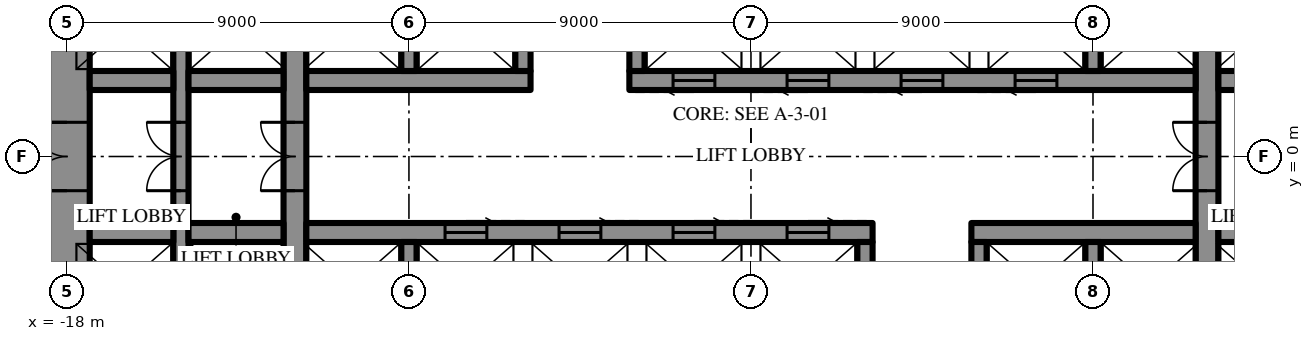
"""IFC4 building model, lengths in metres.
Left out: names, types, materials, properties, quantities, classifications, styles, units other than length and angle.
Written with IfcOpenShell. Run it as: python <this file> out.ifc"""

import sys

from ifc_helpers import new_model, si_unit, direction, frame, frame_2d, origin, place, context, subcontext, project, spatial, rectangle, extrude, element, fill, save


model = new_model("IFC4")
c1 = context("Model", 3, precision=1e-05, world=origin(), true_north=direction((0.0, 1.0)))
c2 = subcontext(c1, "Body", "Model", "MODEL_VIEW")
j1 = project(units=[si_unit("LENGTHUNIT", "METRE"), si_unit("PLANEANGLEUNIT", "RADIAN")], contexts=[c1])
p1 = place(None, origin())
s1 = spatial("IfcSite", under=j1, at=p1, CompositionType="ELEMENT")
p2 = place(p1, origin())
s2 = spatial("IfcBuilding", under=s1, at=p2, CompositionType="ELEMENT")
p3 = place(p2, frame((0.0, 0.0, 31.9)))
s3 = spatial("IfcBuildingStorey", under=s2, at=p3, CompositionType="ELEMENT", Elevation=31.9)
p4 = place(p3, frame((-18.0, 10.7, 0.0), z_axis=(0.0, 0.0, 1.0), x_axis=(0.0, -1.0, 0.0)))
e1 = element("IfcWall", 1, at=p4, inside=s3, PredefinedType="SHEAR", context=c2, shape_type="SweptSolid", body=[
    extrude(rectangle(XDim=21.4, YDim=1.2, at=frame_2d((10.7, 0.0))), origin(), (0.0, 0.0, 1.0), 4.2),
])
p5 = place(p4, frame((9.8, 0.0, 0.0)))
e2 = element("IfcOpeningElement", 2, at=p5, cuts=e1, PredefinedType="OPENING", context=c2, shape_type="SweptSolid", body=[
    extrude(rectangle(XDim=1.8, YDim=2.4, at=frame_2d((0.9, 1.2))), frame((0.0, 0.61, 0.0), z_axis=(0.0, -1.0, 0.0), x_axis=(1.0, 0.0, 0.0)), (0.0, 0.0, 1.0), 1.22),
])
p6 = place(p3, frame((12.0, -10.7, 0.0), z_axis=(0.0, 0.0, 1.0), x_axis=(0.0, 1.0, 0.0)))
e3 = element("IfcWall", 3, at=p6, inside=s3, PredefinedType="SHEAR", context=c2, shape_type="SweptSolid", body=[
    extrude(rectangle(XDim=21.4, YDim=0.6, at=frame_2d((10.7, 0.0))), origin(), (0.0, 0.0, 1.0), 4.2),
])
p7 = place(p6, frame((9.8, 0.0, 0.0)))
e4 = element("IfcOpeningElement", 4, at=p7, cuts=e3, PredefinedType="OPENING", context=c2, shape_type="SweptSolid", body=[
    extrude(rectangle(XDim=1.8, YDim=2.4, at=frame_2d((0.9, 1.2))), frame((0.0, 0.31, 0.0), z_axis=(0.0, -1.0, 0.0), x_axis=(1.0, 0.0, 0.0)), (0.0, 0.0, 1.0), 0.62),
])
p8 = place(p3, frame((-12.0, -10.7, 0.0), z_axis=(0.0, 0.0, 1.0), x_axis=(0.0, 1.0, 0.0)))
e5 = element("IfcWall", 5, at=p8, inside=s3, PredefinedType="SHEAR", context=c2, shape_type="SweptSolid", body=[
    extrude(rectangle(XDim=21.4, YDim=0.6, at=frame_2d((10.7, 0.0))), origin(), (0.0, 0.0, 1.0), 4.2),
])
p9 = place(p8, frame((9.8, 0.0, 0.0)))
e6 = element("IfcOpeningElement", 6, at=p9, cuts=e5, PredefinedType="OPENING", context=c2, shape_type="SweptSolid", body=[
    extrude(rectangle(XDim=1.8, YDim=2.4, at=frame_2d((0.9, 1.2))), frame((0.0, 0.31, 0.0), z_axis=(0.0, -1.0, 0.0), x_axis=(1.0, 0.0, 0.0)), (0.0, 0.0, 1.0), 0.62),
])
p10 = place(p3, frame((-15.0, -10.7, 0.0), z_axis=(0.0, 0.0, 1.0), x_axis=(0.0, 1.0, 0.0)))
e7 = element("IfcWall", 7, at=p10, inside=s3, PredefinedType="SHEAR", context=c2, shape_type="SweptSolid", body=[
    extrude(rectangle(XDim=21.4, YDim=0.4, at=frame_2d((10.7, 0.0))), origin(), (0.0, 0.0, 1.0), 4.2),
])
p11 = place(p10, frame((9.8, 0.0, 0.0)))
e8 = element("IfcOpeningElement", 8, at=p11, cuts=e7, PredefinedType="OPENING", context=c2, shape_type="SweptSolid", body=[
    extrude(rectangle(XDim=1.8, YDim=2.4, at=frame_2d((0.9, 1.2))), frame((0.0, 0.21, 0.0), z_axis=(0.0, -1.0, 0.0), x_axis=(1.0, 0.0, 0.0)), (0.0, 0.0, 1.0), 0.42),
])
p12 = place(p3, frame((-17.4, 2.0, 0.0), z_axis=(0.0, 0.0, 1.0), x_axis=(1.0, 0.0, 0.0)))
e9 = element("IfcWall", 9, at=p12, inside=s3, PredefinedType="SHEAR", context=c2, shape_type="SweptSolid", body=[
    extrude(rectangle(XDim=2.2, YDim=0.5, at=frame_2d((1.1, 0.0))), origin(), (0.0, 0.0, 1.0), 4.2),
])
p13 = place(p3, frame((-14.8, 2.0, 0.0), z_axis=(0.0, 0.0, 1.0), x_axis=(1.0, 0.0, 0.0)))
e10 = element("IfcWall", 10, at=p13, inside=s3, PredefinedType="SHEAR", context=c2, shape_type="SweptSolid", body=[
    extrude(rectangle(XDim=2.5, YDim=0.5, at=frame_2d((1.25, 0.0))), origin(), (0.0, 0.0, 1.0), 4.2),
])
p14 = place(p3, frame((-11.7, 2.0, 0.0), z_axis=(0.0, 0.0, 1.0), x_axis=(1.0, 0.0, 0.0)))
e11 = element("IfcWall", 11, at=p14, inside=s3, PredefinedType="SHEAR", context=c2, shape_type="SweptSolid", body=[
    extrude(rectangle(XDim=5.9, YDim=0.5, at=frame_2d((2.95, 0.0))), origin(), (0.0, 0.0, 1.0), 4.2),
])
p15 = place(p3, frame((-3.2, 2.0, 0.0), z_axis=(0.0, 0.0, 1.0), x_axis=(1.0, 0.0, 0.0)))
e12 = element("IfcWall", 12, at=p15, inside=s3, PredefinedType="SHEAR", context=c2, shape_type="SweptSolid", body=[
    extrude(rectangle(XDim=14.9, YDim=0.5, at=frame_2d((7.45, 0.0))), origin(), (0.0, 0.0, 1.0), 4.2),
])
p16 = place(p15, frame((1.15, 0.0, 0.0)))
e13 = element("IfcOpeningElement", 13, at=p16, cuts=e12, PredefinedType="OPENING", context=c2, shape_type="SweptSolid", body=[
    extrude(rectangle(XDim=1.1, YDim=2.2, at=frame_2d((0.55, 1.1))), frame((0.0, 0.26, 0.0), z_axis=(0.0, -1.0, 0.0), x_axis=(1.0, 0.0, 0.0)), (0.0, 0.0, 1.0), 0.52),
])
p17 = place(p15, frame((4.15, 0.0, 0.0)))
e14 = element("IfcOpeningElement", 14, at=p17, cuts=e12, PredefinedType="OPENING", context=c2, shape_type="SweptSolid", body=[
    extrude(rectangle(XDim=1.1, YDim=2.2, at=frame_2d((0.55, 1.1))), frame((0.0, 0.26, 0.0), z_axis=(0.0, -1.0, 0.0), x_axis=(1.0, 0.0, 0.0)), (0.0, 0.0, 1.0), 0.52),
])
p18 = place(p15, frame((7.15, 0.0, 0.0)))
e15 = element("IfcOpeningElement", 15, at=p18, cuts=e12, PredefinedType="OPENING", context=c2, shape_type="SweptSolid", body=[
    extrude(rectangle(XDim=1.1, YDim=2.2, at=frame_2d((0.55, 1.1))), frame((0.0, 0.26, 0.0), z_axis=(0.0, -1.0, 0.0), x_axis=(1.0, 0.0, 0.0)), (0.0, 0.0, 1.0), 0.52),
])
p19 = place(p15, frame((10.15, 0.0, 0.0)))
e16 = element("IfcOpeningElement", 16, at=p19, cuts=e12, PredefinedType="OPENING", context=c2, shape_type="SweptSolid", body=[
    extrude(rectangle(XDim=1.1, YDim=2.2, at=frame_2d((0.55, 1.1))), frame((0.0, 0.26, 0.0), z_axis=(0.0, -1.0, 0.0), x_axis=(1.0, 0.0, 0.0)), (0.0, 0.0, 1.0), 0.52),
])
p20 = place(p3, frame((12.3, 2.0, 0.0), z_axis=(0.0, 0.0, 1.0), x_axis=(1.0, 0.0, 0.0)))
e17 = element("IfcWall", 17, at=p20, inside=s3, PredefinedType="SHEAR", context=c2, shape_type="SweptSolid", body=[
    extrude(rectangle(XDim=2.5, YDim=0.5, at=frame_2d((1.25, 0.0))), origin(), (0.0, 0.0, 1.0), 4.2),
])
for number, where, z_axis, x_axis in (
    (18, (-9.0, 2.25, 0.0), (0.0, 0.0, 1.0), (0.0, 1.0, 0.0)),
    (19, (-6.0, 2.25, 0.0), (0.0, 0.0, 1.0), (0.0, 1.0, 0.0)),
    (20, (-3.0, 2.25, 0.0), (0.0, 0.0, 1.0), (0.0, 1.0, 0.0)),
    (21, (9.0, 2.25, 0.0), (0.0, 0.0, 1.0), (0.0, 1.0, 0.0)),
):
    element("IfcWall", number, at=place(p3, frame(where, z_axis=z_axis, x_axis=x_axis)), inside=s3, PredefinedType="SHEAR", context=c2, shape_type="SweptSolid", body=[
        extrude(rectangle(XDim=2.3, YDim=0.4, at=frame_2d((1.15, 0.0))), origin(), (0.0, 0.0, 1.0), 4.2),
    ])
p21 = place(p3, frame((14.8, -2.0, 0.0), z_axis=(0.0, 0.0, 1.0), x_axis=(-1.0, 0.0, 0.0)))
e22 = element("IfcWall", 22, at=p21, inside=s3, PredefinedType="SHEAR", context=c2, shape_type="SweptSolid", body=[
    extrude(rectangle(XDim=2.5, YDim=0.5, at=frame_2d((1.25, 0.0))), origin(), (0.0, 0.0, 1.0), 4.2),
])
p22 = place(p3, frame((11.7, -2.0, 0.0), z_axis=(0.0, 0.0, 1.0), x_axis=(-1.0, 0.0, 0.0)))
e23 = element("IfcWall", 23, at=p22, inside=s3, PredefinedType="SHEAR", context=c2, shape_type="SweptSolid", body=[
    extrude(rectangle(XDim=5.9, YDim=0.5, at=frame_2d((2.95, 0.0))), origin(), (0.0, 0.0, 1.0), 4.2),
])
p23 = place(p3, frame((3.2, -2.0, 0.0), z_axis=(0.0, 0.0, 1.0), x_axis=(-1.0, 0.0, 0.0)))
e24 = element("IfcWall", 24, at=p23, inside=s3, PredefinedType="SHEAR", context=c2, shape_type="SweptSolid", body=[
    extrude(rectangle(XDim=14.9, YDim=0.5, at=frame_2d((7.45, 0.0))), origin(), (0.0, 0.0, 1.0), 4.2),
])
p24 = place(p23, frame((1.15, 0.0, 0.0)))
e25 = element("IfcOpeningElement", 25, at=p24, cuts=e24, PredefinedType="OPENING", context=c2, shape_type="SweptSolid", body=[
    extrude(rectangle(XDim=1.1, YDim=2.2, at=frame_2d((0.55, 1.1))), frame((0.0, 0.26, 0.0), z_axis=(0.0, -1.0, 0.0), x_axis=(1.0, 0.0, 0.0)), (0.0, 0.0, 1.0), 0.52),
])
p25 = place(p23, frame((4.15, 0.0, 0.0)))
e26 = element("IfcOpeningElement", 26, at=p25, cuts=e24, PredefinedType="OPENING", context=c2, shape_type="SweptSolid", body=[
    extrude(rectangle(XDim=1.1, YDim=2.2, at=frame_2d((0.55, 1.1))), frame((0.0, 0.26, 0.0), z_axis=(0.0, -1.0, 0.0), x_axis=(1.0, 0.0, 0.0)), (0.0, 0.0, 1.0), 0.52),
])
p26 = place(p23, frame((7.15, 0.0, 0.0)))
e27 = element("IfcOpeningElement", 27, at=p26, cuts=e24, PredefinedType="OPENING", context=c2, shape_type="SweptSolid", body=[
    extrude(rectangle(XDim=1.1, YDim=2.2, at=frame_2d((0.55, 1.1))), frame((0.0, 0.26, 0.0), z_axis=(0.0, -1.0, 0.0), x_axis=(1.0, 0.0, 0.0)), (0.0, 0.0, 1.0), 0.52),
])
p27 = place(p23, frame((10.15, 0.0, 0.0)))
e28 = element("IfcOpeningElement", 28, at=p27, cuts=e24, PredefinedType="OPENING", context=c2, shape_type="SweptSolid", body=[
    extrude(rectangle(XDim=1.1, YDim=2.2, at=frame_2d((0.55, 1.1))), frame((0.0, 0.26, 0.0), z_axis=(0.0, -1.0, 0.0), x_axis=(1.0, 0.0, 0.0)), (0.0, 0.0, 1.0), 0.52),
])
p28 = place(p3, frame((-12.3, -2.0, 0.0), z_axis=(0.0, 0.0, 1.0), x_axis=(-1.0, 0.0, 0.0)))
e29 = element("IfcWall", 29, at=p28, inside=s3, PredefinedType="SHEAR", context=c2, shape_type="SweptSolid", body=[
    extrude(rectangle(XDim=2.5, YDim=0.5, at=frame_2d((1.25, 0.0))), origin(), (0.0, 0.0, 1.0), 4.2),
])
p29 = place(p3, frame((-15.2, -2.0, 0.0), z_axis=(0.0, 0.0, 1.0), x_axis=(-1.0, 0.0, 0.0)))
e30 = element("IfcWall", 30, at=p29, inside=s3, PredefinedType="SHEAR", context=c2, shape_type="SweptSolid", body=[
    extrude(rectangle(XDim=2.2, YDim=0.5, at=frame_2d((1.1, 0.0))), origin(), (0.0, 0.0, 1.0), 4.2),
])
for number, where, z_axis, x_axis in (
    (31, (9.0, -2.25, 0.0), (0.0, 0.0, 1.0), (0.0, -1.0, 0.0)),
    (32, (6.0, -2.25, 0.0), (0.0, 0.0, 1.0), (0.0, -1.0, 0.0)),
    (33, (3.0, -2.25, 0.0), (0.0, 0.0, 1.0), (0.0, -1.0, 0.0)),
    (34, (-9.0, -2.25, 0.0), (0.0, 0.0, 1.0), (0.0, -1.0, 0.0)),
):
    element("IfcWall", number, at=place(p3, frame(where, z_axis=z_axis, x_axis=x_axis)), inside=s3, PredefinedType="SHEAR", context=c2, shape_type="SweptSolid", body=[
        extrude(rectangle(XDim=2.3, YDim=0.4, at=frame_2d((1.15, 0.0))), origin(), (0.0, 0.0, 1.0), 4.2),
    ])
p30 = place(p5, frame((1.8, 0.0, 0.0), z_axis=(0.0, 0.0, 1.0), x_axis=(-1.0, 0.0, 0.0)))
e35 = element("IfcDoor", 35, at=p30, inside=s3, OperationType="DOUBLE_DOOR_SINGLE_SWING", PredefinedType="DOOR", context=c2, shape_type="SweptSolid", body=[
    extrude(rectangle(XDim=1.8, YDim=2.4, at=frame_2d((0.9, 1.2))), frame((0.0, 0.025, 0.0), z_axis=(0.0, -1.0, 0.0), x_axis=(1.0, 0.0, 0.0)), (0.0, 0.0, 1.0), 0.05),
])
fill(e2, e35)
p31 = place(p7, origin())
e36 = element("IfcDoor", 36, at=p31, inside=s3, OperationType="DOUBLE_DOOR_SINGLE_SWING", PredefinedType="DOOR", context=c2, shape_type="SweptSolid", body=[
    extrude(rectangle(XDim=1.8, YDim=2.4, at=frame_2d((0.9, 1.2))), frame((0.0, 0.025, 0.0), z_axis=(0.0, -1.0, 0.0), x_axis=(1.0, 0.0, 0.0)), (0.0, 0.0, 1.0), 0.05),
])
fill(e4, e36)
p32 = place(p9, origin())
e37 = element("IfcDoor", 37, at=p32, inside=s3, OperationType="DOUBLE_DOOR_SINGLE_SWING", PredefinedType="DOOR", context=c2, shape_type="SweptSolid", body=[
    extrude(rectangle(XDim=1.8, YDim=2.4, at=frame_2d((0.9, 1.2))), frame((0.0, 0.025, 0.0), z_axis=(0.0, -1.0, 0.0), x_axis=(1.0, 0.0, 0.0)), (0.0, 0.0, 1.0), 0.05),
])
fill(e6, e37)
p33 = place(p11, origin())
e38 = element("IfcDoor", 38, at=p33, inside=s3, OperationType="DOUBLE_DOOR_SINGLE_SWING", PredefinedType="DOOR", context=c2, shape_type="SweptSolid", body=[
    extrude(rectangle(XDim=1.8, YDim=2.4, at=frame_2d((0.9, 1.2))), frame((0.0, 0.025, 0.0), z_axis=(0.0, -1.0, 0.0), x_axis=(1.0, 0.0, 0.0)), (0.0, 0.0, 1.0), 0.05),
])
fill(e8, e38)
p34 = place(p16, frame((1.1, 0.0, 0.0), z_axis=(0.0, 0.0, 1.0), x_axis=(-1.0, 0.0, 0.0)))
e39 = element("IfcDoor", 39, at=p34, inside=s3, OperationType="SLIDING_TO_LEFT", PredefinedType="DOOR", context=c2, shape_type="SweptSolid", body=[
    extrude(rectangle(XDim=1.1, YDim=2.2, at=frame_2d((0.55, 1.1))), frame((0.0, 0.025, 0.0), z_axis=(0.0, -1.0, 0.0), x_axis=(1.0, 0.0, 0.0)), (0.0, 0.0, 1.0), 0.05),
])
fill(e13, e39)
p35 = place(p17, frame((1.1, 0.0, 0.0), z_axis=(0.0, 0.0, 1.0), x_axis=(-1.0, 0.0, 0.0)))
e40 = element("IfcDoor", 40, at=p35, inside=s3, OperationType="SLIDING_TO_LEFT", PredefinedType="DOOR", context=c2, shape_type="SweptSolid", body=[
    extrude(rectangle(XDim=1.1, YDim=2.2, at=frame_2d((0.55, 1.1))), frame((0.0, 0.025, 0.0), z_axis=(0.0, -1.0, 0.0), x_axis=(1.0, 0.0, 0.0)), (0.0, 0.0, 1.0), 0.05),
])
fill(e14, e40)
p36 = place(p18, frame((1.1, 0.0, 0.0), z_axis=(0.0, 0.0, 1.0), x_axis=(-1.0, 0.0, 0.0)))
e41 = element("IfcDoor", 41, at=p36, inside=s3, OperationType="SLIDING_TO_LEFT", PredefinedType="DOOR", context=c2, shape_type="SweptSolid", body=[
    extrude(rectangle(XDim=1.1, YDim=2.2, at=frame_2d((0.55, 1.1))), frame((0.0, 0.025, 0.0), z_axis=(0.0, -1.0, 0.0), x_axis=(1.0, 0.0, 0.0)), (0.0, 0.0, 1.0), 0.05),
])
fill(e15, e41)
p37 = place(p19, frame((1.1, 0.0, 0.0), z_axis=(0.0, 0.0, 1.0), x_axis=(-1.0, 0.0, 0.0)))
e42 = element("IfcDoor", 42, at=p37, inside=s3, OperationType="SLIDING_TO_LEFT", PredefinedType="DOOR", context=c2, shape_type="SweptSolid", body=[
    extrude(rectangle(XDim=1.1, YDim=2.2, at=frame_2d((0.55, 1.1))), frame((0.0, 0.025, 0.0), z_axis=(0.0, -1.0, 0.0), x_axis=(1.0, 0.0, 0.0)), (0.0, 0.0, 1.0), 0.05),
])
fill(e16, e42)
p38 = place(p24, frame((1.1, 0.0, 0.0), z_axis=(0.0, 0.0, 1.0), x_axis=(-1.0, 0.0, 0.0)))
e43 = element("IfcDoor", 43, at=p38, inside=s3, OperationType="SLIDING_TO_LEFT", PredefinedType="DOOR", context=c2, shape_type="SweptSolid", body=[
    extrude(rectangle(XDim=1.1, YDim=2.2, at=frame_2d((0.55, 1.1))), frame((0.0, 0.025, 0.0), z_axis=(0.0, -1.0, 0.0), x_axis=(1.0, 0.0, 0.0)), (0.0, 0.0, 1.0), 0.05),
])
fill(e25, e43)
p39 = place(p25, frame((1.1, 0.0, 0.0), z_axis=(0.0, 0.0, 1.0), x_axis=(-1.0, 0.0, 0.0)))
e44 = element("IfcDoor", 44, at=p39, inside=s3, OperationType="SLIDING_TO_LEFT", PredefinedType="DOOR", context=c2, shape_type="SweptSolid", body=[
    extrude(rectangle(XDim=1.1, YDim=2.2, at=frame_2d((0.55, 1.1))), frame((0.0, 0.025, 0.0), z_axis=(0.0, -1.0, 0.0), x_axis=(1.0, 0.0, 0.0)), (0.0, 0.0, 1.0), 0.05),
])
fill(e26, e44)
p40 = place(p26, frame((1.1, 0.0, 0.0), z_axis=(0.0, 0.0, 1.0), x_axis=(-1.0, 0.0, 0.0)))
e45 = element("IfcDoor", 45, at=p40, inside=s3, OperationType="SLIDING_TO_LEFT", PredefinedType="DOOR", context=c2, shape_type="SweptSolid", body=[
    extrude(rectangle(XDim=1.1, YDim=2.2, at=frame_2d((0.55, 1.1))), frame((0.0, 0.025, 0.0), z_axis=(0.0, -1.0, 0.0), x_axis=(1.0, 0.0, 0.0)), (0.0, 0.0, 1.0), 0.05),
])
fill(e27, e45)
p41 = place(p27, frame((1.1, 0.0, 0.0), z_axis=(0.0, 0.0, 1.0), x_axis=(-1.0, 0.0, 0.0)))
e46 = element("IfcDoor", 46, at=p41, inside=s3, OperationType="SLIDING_TO_LEFT", PredefinedType="DOOR", context=c2, shape_type="SweptSolid", body=[
    extrude(rectangle(XDim=1.1, YDim=2.2, at=frame_2d((0.55, 1.1))), frame((0.0, 0.025, 0.0), z_axis=(0.0, -1.0, 0.0), x_axis=(1.0, 0.0, 0.0)), (0.0, 0.0, 1.0), 0.05),
])
fill(e28, e46)
save(model, sys.argv[1])
